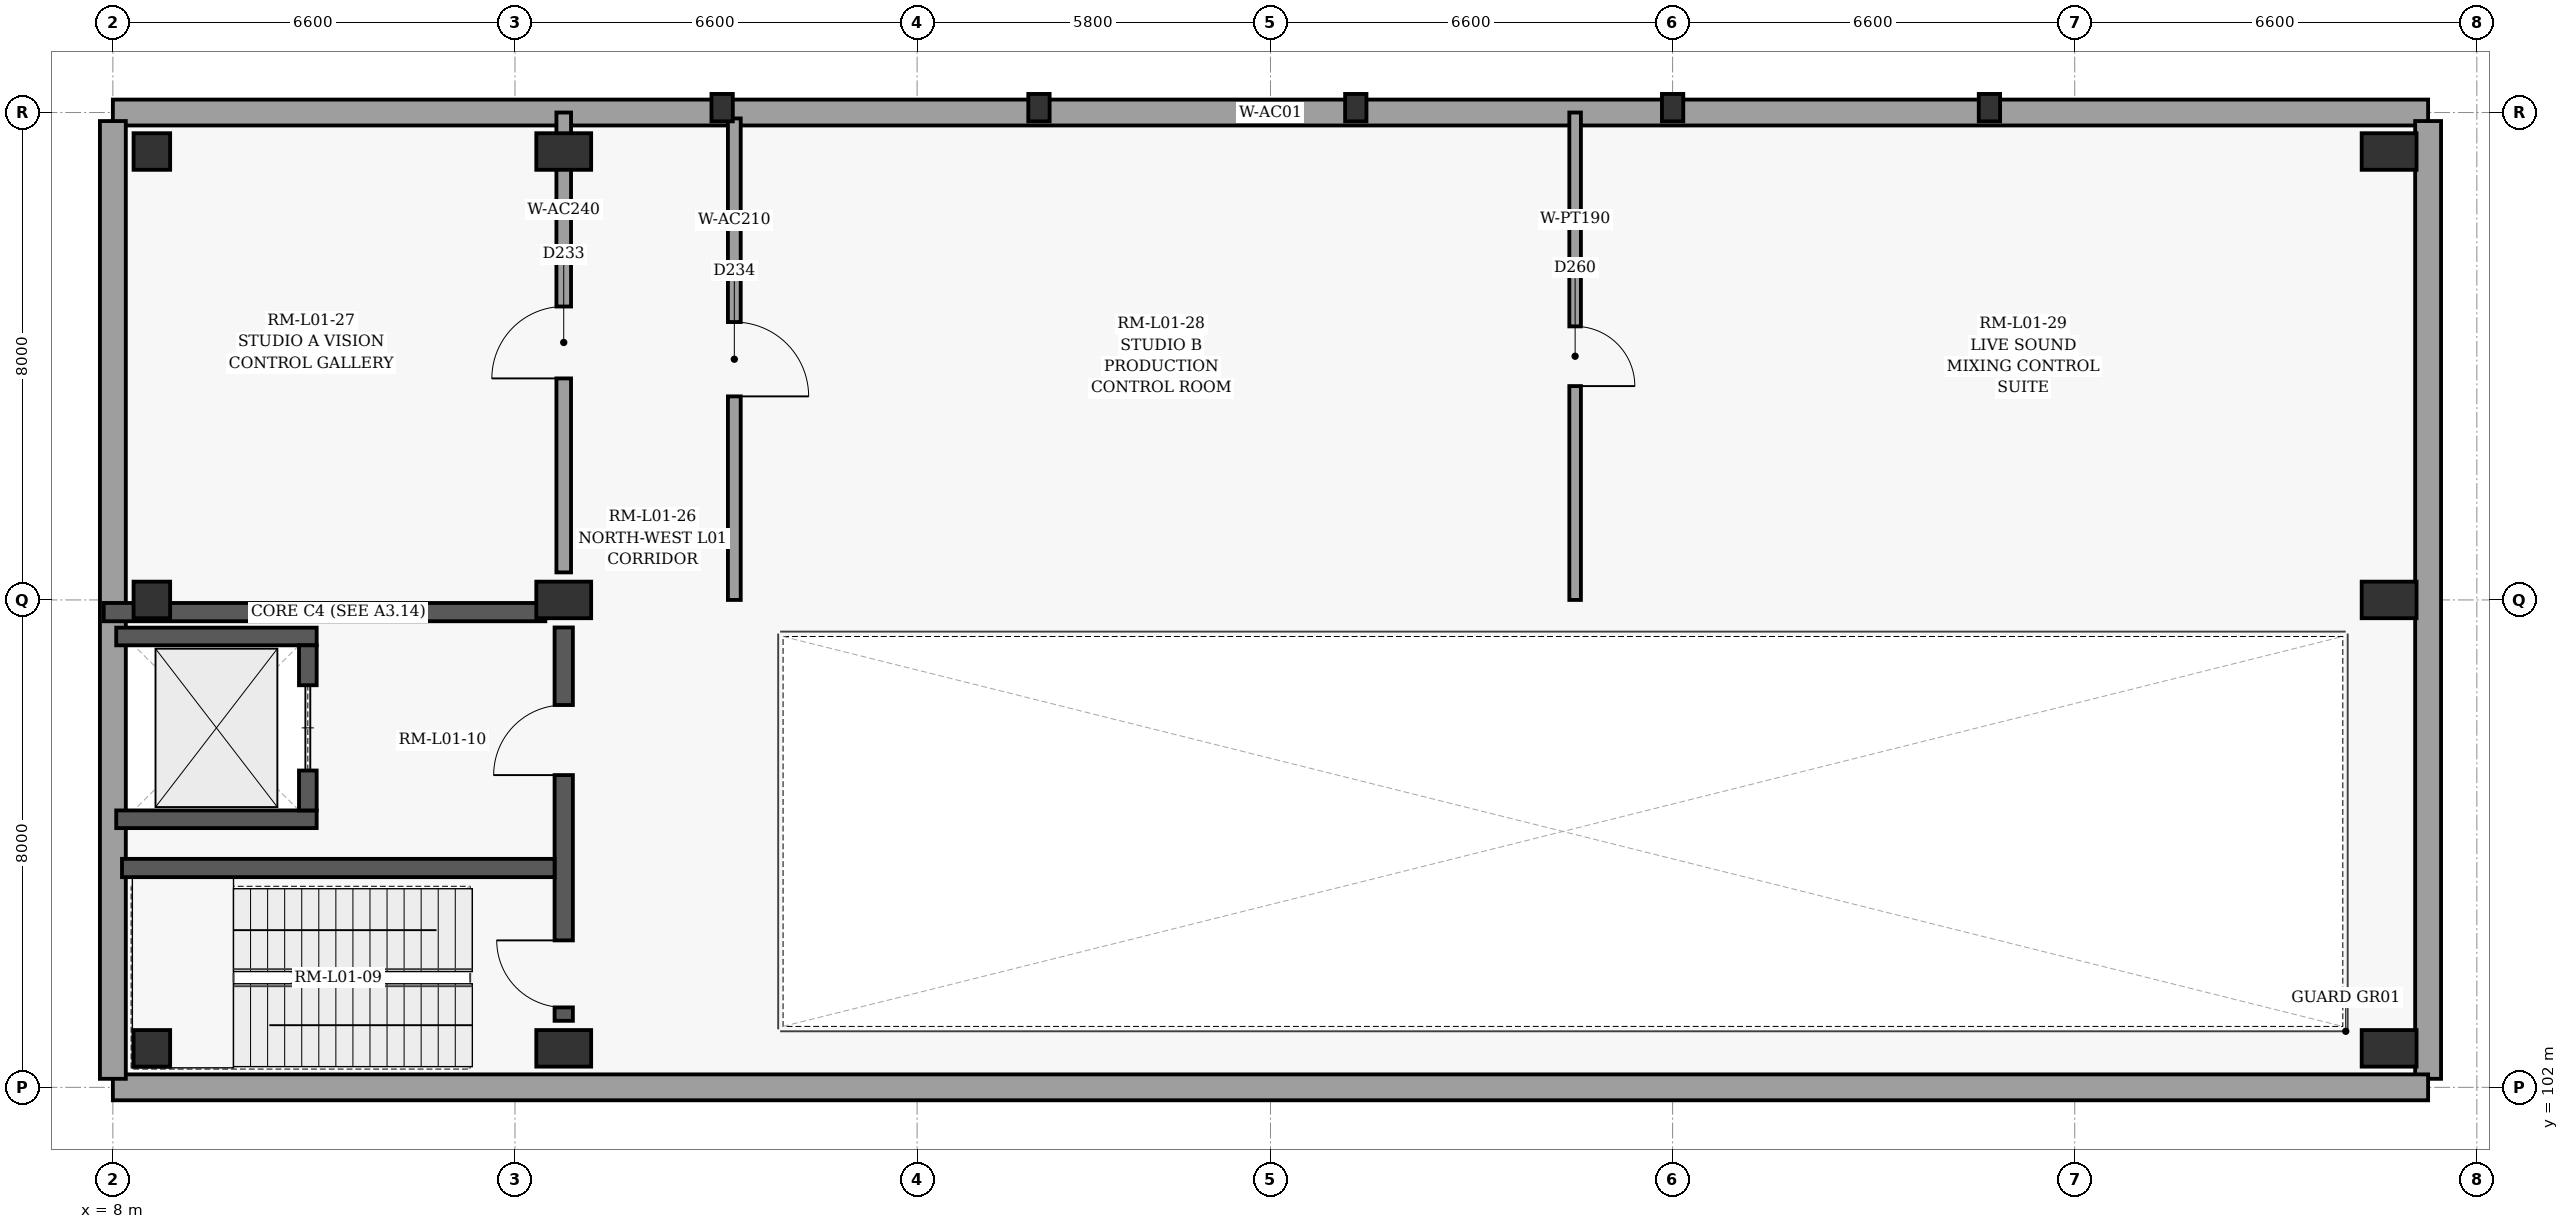
"""IFC4 building model, lengths in metres.
Left out: names, types, materials, properties, quantities, classifications, styles, units other than length and angle.
Written with IfcOpenShell. Run it as: python <this file> out.ifc"""

import sys

from ifc_helpers import new_model, si_unit, direction, frame, frame_2d, origin, origin_2d, place, context, subcontext, project, spatial, rectangle, extrude, element, fill, save


model = new_model("IFC4")
c1 = context("Model", 3, precision=1e-05, world=origin(), true_north=direction((0.0, 1.0)))
c2 = subcontext(c1, "Body", "Model", "MODEL_VIEW")
j1 = project(units=[si_unit("LENGTHUNIT", "METRE"), si_unit("PLANEANGLEUNIT", "RADIAN")], contexts=[c1])
p1 = place(None, origin())
s1 = spatial("IfcSite", under=j1, at=p1, CompositionType="ELEMENT")
p2 = place(p1, origin())
s2 = spatial("IfcBuilding", under=s1, at=p2, CompositionType="ELEMENT")
p3 = place(p2, frame((0.0, 0.0, 5.4)))
s3 = spatial("IfcBuildingStorey", under=s2, at=p3, CompositionType="ELEMENT", Elevation=5.4)
for number, where, z_axis, x_axis in (
    (1, (8.64, 102.64, 0.0), (0.0, 0.0, 1.0), (1.0, 0.0, 0.0)),
    (2, (8.64, 110.0, 0.0), (0.0, 0.0, 1.0), (1.0, 0.0, 0.0)),
    (3, (8.64, 117.36, 0.0), (0.0, 0.0, 1.0), (1.0, 0.0, 0.0)),
):
    element("IfcColumn", number, at=place(p3, frame(where, z_axis=z_axis, x_axis=x_axis)), inside=s3, PredefinedType="COLUMN", context=c2, shape_type="SweptSolid", body=[
        extrude(rectangle(XDim=0.6, YDim=0.6, at=origin_2d()), origin(), (0.0, 0.0, 1.0), 4.8),
    ])
for number, where, z_axis, x_axis in (
    (4, (15.4, 102.64, 0.0), (0.0, 0.0, 1.0), (1.0, 0.0, 0.0)),
    (5, (15.4, 110.0, 0.0), (0.0, 0.0, 1.0), (1.0, 0.0, 0.0)),
    (6, (15.4, 117.36, 0.0), (0.0, 0.0, 1.0), (1.0, 0.0, 0.0)),
    (7, (45.36, 102.64, 0.0), (0.0, 0.0, 1.0), (1.0, 0.0, 0.0)),
    (8, (45.36, 110.0, 0.0), (0.0, 0.0, 1.0), (1.0, 0.0, 0.0)),
    (9, (45.36, 117.36, 0.0), (0.0, 0.0, 1.0), (1.0, 0.0, 0.0)),
):
    element("IfcColumn", number, at=place(p3, frame(where, z_axis=z_axis, x_axis=x_axis)), inside=s3, PredefinedType="COLUMN", context=c2, shape_type="SweptSolid", body=[
        extrude(rectangle(XDim=0.6, YDim=0.9, at=origin_2d()), origin(), (0.0, 0.0, 1.0), 4.8),
    ])
for number, where, z_axis, x_axis in (
    (10, (18.0, 118.08, 0.0), (0.0, 0.0, 1.0), (0.0, 1.0, 0.0)),
    (11, (23.2, 118.08, 0.0), (0.0, 0.0, 1.0), (0.0, 1.0, 0.0)),
    (12, (28.4, 118.08, 0.0), (0.0, 0.0, 1.0), (0.0, 1.0, 0.0)),
    (13, (33.6, 118.08, 0.0), (0.0, 0.0, 1.0), (0.0, 1.0, 0.0)),
    (14, (38.8, 118.08, 0.0), (0.0, 0.0, 1.0), (0.0, 1.0, 0.0)),
):
    element("IfcColumn", number, at=place(p3, frame(where, z_axis=z_axis, x_axis=x_axis)), inside=s3, PredefinedType="PILASTER", context=c2, shape_type="SweptSolid", body=[
        extrude(rectangle(XDim=0.35, YDim=0.45, at=origin_2d()), origin(), (0.0, 0.0, 1.0), 4.8),
    ])
p4 = place(p3, frame((8.0, 118.0, 0.0), z_axis=(0.0, 0.0, 1.0), x_axis=(1.0, 0.0, 0.0)))
e15 = element("IfcWall", 15, at=p4, inside=s3, PredefinedType="SOLIDWALL", context=c2, shape_type="SweptSolid", body=[
    extrude(rectangle(XDim=38.0, YDim=0.425, at=frame_2d((19.0, 0.0))), origin(), (0.0, 0.0, 1.0), 4.54),
])
p5 = place(p3, frame((46.0, 117.86, 0.0), z_axis=(0.0, 0.0, 1.0), x_axis=(0.0, -1.0, 0.0)))
e16 = element("IfcWall", 16, at=p5, inside=s3, PredefinedType="SOLIDWALL", context=c2, shape_type="SweptSolid", body=[
    extrude(rectangle(XDim=15.72, YDim=0.425, at=frame_2d((7.86, 0.0))), origin(), (0.0, 0.0, 1.0), 4.54),
])
p6 = place(p3, frame((46.0, 102.0, 0.0), z_axis=(0.0, 0.0, 1.0), x_axis=(-1.0, 0.0, 0.0)))
e17 = element("IfcWall", 17, at=p6, inside=s3, PredefinedType="SOLIDWALL", context=c2, shape_type="SweptSolid", body=[
    extrude(rectangle(XDim=38.0, YDim=0.425, at=frame_2d((19.0, 0.0))), origin(), (0.0, 0.0, 1.0), 4.54),
])
p7 = place(p3, frame((8.0, 102.14, 0.0), z_axis=(0.0, 0.0, 1.0), x_axis=(0.0, 1.0, 0.0)))
e18 = element("IfcWall", 18, at=p7, inside=s3, PredefinedType="SOLIDWALL", context=c2, shape_type="SweptSolid", body=[
    extrude(rectangle(XDim=15.72, YDim=0.425, at=frame_2d((7.86, 0.0))), origin(), (0.0, 0.0, 1.0), 4.54),
])
p8 = place(p3, frame((7.85, 109.8, 0.0), z_axis=(0.0, 0.0, 1.0), x_axis=(1.0, 0.0, 0.0)))
e19 = element("IfcWall", 19, at=p8, inside=s3, PredefinedType="SHEAR", context=c2, shape_type="SweptSolid", body=[
    extrude(rectangle(XDim=7.248, YDim=0.3, at=frame_2d((3.624, 0.0))), origin(), (0.0, 0.0, 1.0), 4.54),
])
p9 = place(p3, frame((15.4, 103.092, 0.0), z_axis=(0.0, 0.0, 1.0), x_axis=(0.0, 1.0, 0.0)))
e20 = element("IfcWall", 20, at=p9, inside=s3, PredefinedType="SHEAR", context=c2, shape_type="SweptSolid", body=[
    extrude(rectangle(XDim=6.456, YDim=0.3, at=frame_2d((3.228, 0.0))), origin(), (0.0, 0.0, 1.0), 4.54),
])
p10 = place(p9, frame((0.22, 0.0, 0.0)))
e21 = element("IfcOpeningElement", 21, at=p10, cuts=e20, PredefinedType="OPENING", context=c2, shape_type="SweptSolid", body=[
    extrude(rectangle(XDim=1.1, YDim=2.15, at=frame_2d((0.55, 1.075))), frame((0.0, 0.16, 0.0), z_axis=(0.0, -1.0, 0.0), x_axis=(1.0, 0.0, 0.0)), (0.0, 0.0, 1.0), 0.32),
])
p11 = place(p9, frame((4.033, 0.0, 0.0)))
e22 = element("IfcOpeningElement", 22, at=p11, cuts=e20, PredefinedType="OPENING", context=c2, shape_type="SweptSolid", body=[
    extrude(rectangle(XDim=1.15, YDim=2.2, at=frame_2d((0.575, 1.1))), frame((0.0, 0.16, 0.0), z_axis=(0.0, -1.0, 0.0), x_axis=(1.0, 0.0, 0.0)), (0.0, 0.0, 1.0), 0.32),
])
p12 = place(p3, frame((8.15, 105.6, 0.0), z_axis=(0.0, 0.0, 1.0), x_axis=(1.0, 0.0, 0.0)))
e23 = element("IfcWall", 23, at=p12, inside=s3, PredefinedType="SHEAR", context=c2, shape_type="SweptSolid", body=[
    extrude(rectangle(XDim=7.1, YDim=0.3, at=frame_2d((3.55, 0.0))), origin(), (0.0, 0.0, 1.0), 4.54),
])
for number, where, z_axis, x_axis in (
    (24, (8.055, 106.4, 0.0), (0.0, 0.0, 1.0), (1.0, 0.0, 0.0)),
    (25, (8.055, 109.4, 0.0), (0.0, 0.0, 1.0), (1.0, 0.0, 0.0)),
):
    element("IfcWall", number, at=place(p3, frame(where, z_axis=z_axis, x_axis=x_axis)), inside=s3, PredefinedType="SHEAR", context=c2, shape_type="SweptSolid", body=[
        extrude(rectangle(XDim=3.29, YDim=0.29, at=frame_2d((1.645, 0.0))), origin(), (0.0, 0.0, 1.0), 4.54),
    ])
p13 = place(p3, frame((11.2, 106.545, 0.0), z_axis=(0.0, 0.0, 1.0), x_axis=(0.0, 1.0, 0.0)))
e26 = element("IfcWall", 26, at=p13, inside=s3, PredefinedType="SHEAR", context=c2, shape_type="SweptSolid", body=[
    extrude(rectangle(XDim=2.71, YDim=0.29, at=frame_2d((1.355, 0.0))), origin(), (0.0, 0.0, 1.0), 4.54),
])
p14 = place(p13, frame((0.655, 0.0, 0.0)))
e27 = element("IfcOpeningElement", 27, at=p14, cuts=e26, PredefinedType="OPENING", context=c2, shape_type="SweptSolid", body=[
    extrude(rectangle(XDim=1.4, YDim=2.25, at=frame_2d((0.7, 1.125))), frame((0.0, 0.155, 0.0), z_axis=(0.0, -1.0, 0.0), x_axis=(1.0, 0.0, 0.0)), (0.0, 0.0, 1.0), 0.31),
])
p15 = place(p3, frame((15.4, 110.452, 0.0), z_axis=(0.0, 0.0, 1.0), x_axis=(0.0, 1.0, 0.0)))
e28 = element("IfcWall", 28, at=p15, inside=s3, PredefinedType="PARTITIONING", context=c2, shape_type="SweptSolid", body=[
    extrude(rectangle(XDim=7.548, YDim=0.24, at=frame_2d((3.774, 0.0))), origin(), (0.0, 0.0, 1.0), 3.79),
])
p16 = place(p15, frame((3.184, 0.0, 0.0)))
e29 = element("IfcOpeningElement", 29, at=p16, cuts=e28, PredefinedType="OPENING", context=c2, shape_type="SweptSolid", body=[
    extrude(rectangle(XDim=1.18, YDim=2.15, at=frame_2d((0.59, 1.075))), frame((0.0, 0.13, 0.0), z_axis=(0.0, -1.0, 0.0), x_axis=(1.0, 0.0, 0.0)), (0.0, 0.0, 1.0), 0.26),
])
p17 = place(p3, frame((18.2, 117.903, 0.0), z_axis=(0.0, 0.0, 1.0), x_axis=(0.0, -1.0, 0.0)))
e30 = element("IfcWall", 30, at=p17, inside=s3, PredefinedType="PARTITIONING", context=c2, shape_type="SweptSolid", body=[
    extrude(rectangle(XDim=7.903, YDim=0.21, at=frame_2d((3.952, 0.0))), origin(), (0.0, 0.0, 1.0), 4.54),
])
p18 = place(p17, frame((3.342, 0.0, 0.0)))
e31 = element("IfcOpeningElement", 31, at=p18, cuts=e30, PredefinedType="OPENING", context=c2, shape_type="SweptSolid", body=[
    extrude(rectangle(XDim=1.22, YDim=2.2, at=frame_2d((0.61, 1.1))), frame((0.0, 0.115, 0.0), z_axis=(0.0, -1.0, 0.0), x_axis=(1.0, 0.0, 0.0)), (0.0, 0.0, 1.0), 0.23),
])
p19 = place(p3, frame((32.0, 118.0, 0.0), z_axis=(0.0, 0.0, 1.0), x_axis=(0.0, -1.0, 0.0)))
e32 = element("IfcWall", 32, at=p19, inside=s3, PredefinedType="PARTITIONING", context=c2, shape_type="SweptSolid", body=[
    extrude(rectangle(XDim=8.0, YDim=0.19, at=frame_2d((4.0, 0.0))), origin(), (0.0, 0.0, 1.0), 4.54),
])
p20 = place(p19, frame((3.51, 0.0, 0.0)))
e33 = element("IfcOpeningElement", 33, at=p20, cuts=e32, PredefinedType="OPENING", context=c2, shape_type="SweptSolid", body=[
    extrude(rectangle(XDim=0.98, YDim=2.1, at=frame_2d((0.49, 1.05))), frame((0.0, 0.105, 0.0), z_axis=(0.0, -1.0, 0.0), x_axis=(1.0, 0.0, 0.0)), (0.0, 0.0, 1.0), 0.21),
])
p21 = place(p10, origin())
e34 = element("IfcDoor", 34, at=p21, inside=s3, OperationType="SINGLE_SWING_RIGHT", PredefinedType="DOOR", context=c2, shape_type="SweptSolid", body=[
    extrude(rectangle(XDim=1.1, YDim=2.15, at=frame_2d((0.55, 1.075))), frame((0.0, 0.025, 0.0), z_axis=(0.0, -1.0, 0.0), x_axis=(1.0, 0.0, 0.0)), (0.0, 0.0, 1.0), 0.05),
])
fill(e21, e34)
p22 = place(p11, origin())
e35 = element("IfcDoor", 35, at=p22, inside=s3, OperationType="SINGLE_SWING_LEFT", PredefinedType="DOOR", context=c2, shape_type="SweptSolid", body=[
    extrude(rectangle(XDim=1.15, YDim=2.2, at=frame_2d((0.575, 1.1))), frame((0.0, 0.025, 0.0), z_axis=(0.0, -1.0, 0.0), x_axis=(1.0, 0.0, 0.0)), (0.0, 0.0, 1.0), 0.05),
])
fill(e22, e35)
p23 = place(p14, origin())
e36 = element("IfcDoor", 36, at=p23, inside=s3, OperationType="SLIDING_TO_LEFT", PredefinedType="DOOR", context=c2, shape_type="SweptSolid", body=[
    extrude(rectangle(XDim=1.4, YDim=2.25, at=frame_2d((0.7, 1.125))), frame((0.0, 0.025, 0.0), z_axis=(0.0, -1.0, 0.0), x_axis=(1.0, 0.0, 0.0)), (0.0, 0.0, 1.0), 0.05),
])
fill(e27, e36)
p24 = place(p16, origin())
e37 = element("IfcDoor", 37, at=p24, inside=s3, OperationType="SINGLE_SWING_LEFT", PredefinedType="DOOR", context=c2, shape_type="SweptSolid", body=[
    extrude(rectangle(XDim=1.18, YDim=2.15, at=frame_2d((0.59, 1.075))), frame((0.0, 0.025, 0.0), z_axis=(0.0, -1.0, 0.0), x_axis=(1.0, 0.0, 0.0)), (0.0, 0.0, 1.0), 0.05),
])
fill(e29, e37)
p25 = place(p18, origin())
e38 = element("IfcDoor", 38, at=p25, inside=s3, OperationType="SINGLE_SWING_RIGHT", PredefinedType="DOOR", context=c2, shape_type="SweptSolid", body=[
    extrude(rectangle(XDim=1.22, YDim=2.2, at=frame_2d((0.61, 1.1))), frame((0.0, 0.025, 0.0), z_axis=(0.0, -1.0, 0.0), x_axis=(1.0, 0.0, 0.0)), (0.0, 0.0, 1.0), 0.05),
])
fill(e31, e38)
p26 = place(p20, origin())
e39 = element("IfcDoor", 39, at=p26, inside=s3, OperationType="SINGLE_SWING_RIGHT", PredefinedType="DOOR", context=c2, shape_type="SweptSolid", body=[
    extrude(rectangle(XDim=0.98, YDim=2.1, at=frame_2d((0.49, 1.05))), frame((0.0, 0.025, 0.0), z_axis=(0.0, -1.0, 0.0), x_axis=(1.0, 0.0, 0.0)), (0.0, 0.0, 1.0), 0.05),
])
fill(e33, e39)
save(model, sys.argv[1])
